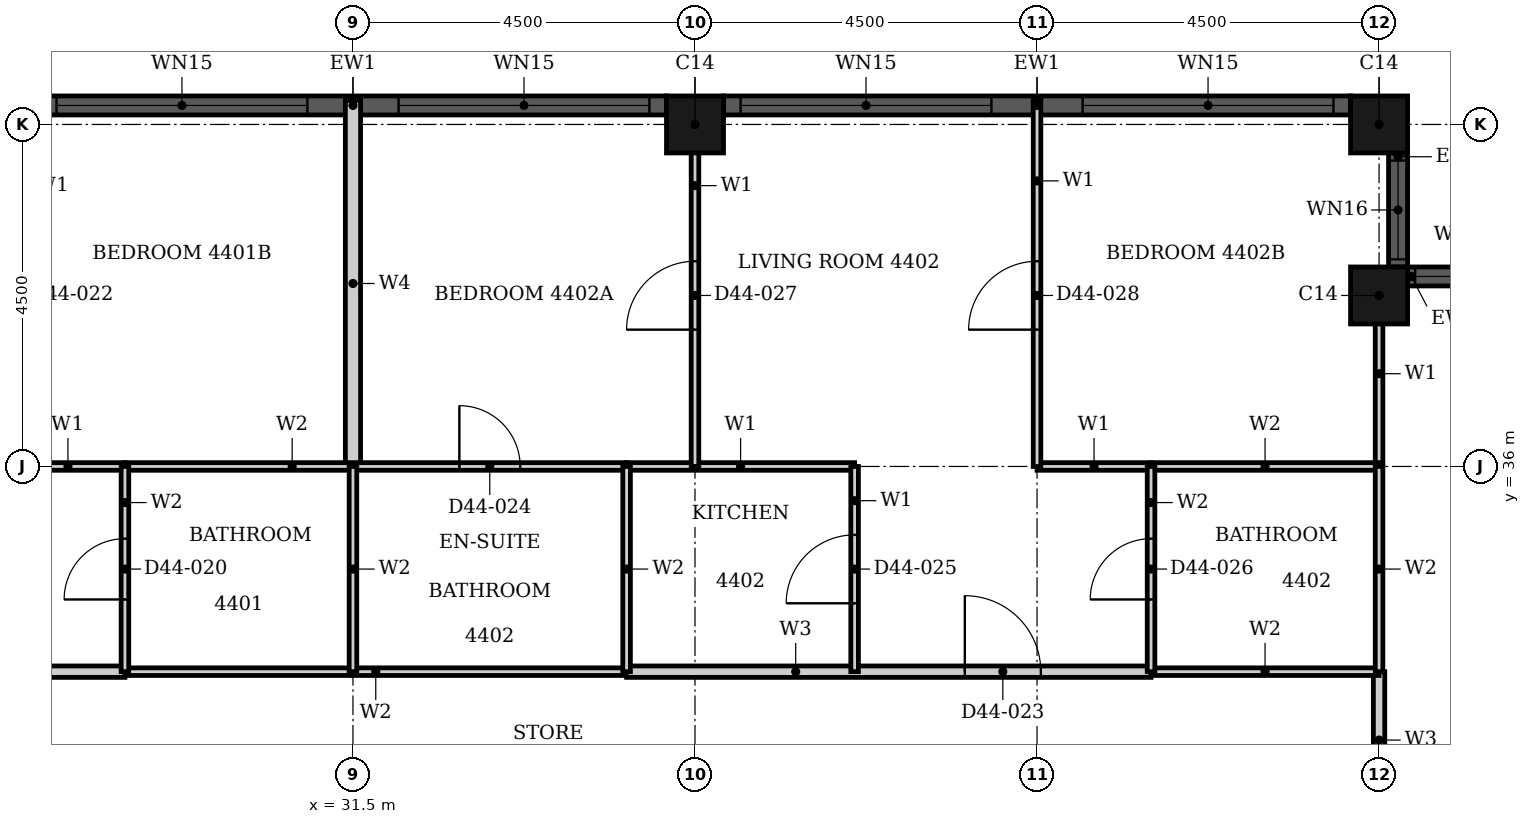
"""IFC4 building model, lengths in metres.
Left out: names, types, materials, properties, quantities, classifications, styles, units other than length and angle.
Written with IfcOpenShell. Run it as: python <this file> out.ifc"""

import sys

from ifc_helpers import new_model, si_unit, direction, frame, frame_2d, origin, origin_2d, place, context, subcontext, project, spatial, rectangle, hollow_rectangle, extrude, element, fill, save


model = new_model("IFC4")
c1 = context("Model", 3, precision=1e-05, world=origin(), true_north=direction((0.0, 1.0)))
c2 = subcontext(c1, "Body", "Model", "MODEL_VIEW")
j1 = project(units=[si_unit("LENGTHUNIT", "METRE"), si_unit("PLANEANGLEUNIT", "RADIAN")], contexts=[c1])
p1 = place(None, origin())
s1 = spatial("IfcSite", under=j1, at=p1, CompositionType="ELEMENT")
p2 = place(p1, origin())
s2 = spatial("IfcBuilding", under=s1, at=p2, CompositionType="ELEMENT")
p3 = place(p2, frame((0.0, 0.0, 176.5)))
s3 = spatial("IfcBuildingStorey", under=s2, at=p3, CompositionType="ELEMENT", Elevation=176.5)
for number, where, z_axis, x_axis in (
    (1, (45.0, 38.25, 0.0), (0.0, 0.0, 1.0), (1.0, 0.0, 0.0)),
    (2, (45.0, 40.5, 0.0), (0.0, 0.0, 1.0), (1.0, 0.0, 0.0)),
    (3, (36.0, 40.5, 0.0), (0.0, 0.0, 1.0), (1.0, 0.0, 0.0)),
):
    element("IfcColumn", number, at=place(p3, frame(where, z_axis=z_axis, x_axis=x_axis)), inside=s3, PredefinedType="COLUMN", context=c2, shape_type="SweptSolid", body=[
        extrude(hollow_rectangle(XDim=0.75, YDim=0.75, WallThickness=0.024, at=origin_2d()), origin(), (0.0, 0.0, 1.0), 3.7),
    ])
p4 = place(p3, frame((46.875, 38.5, 0.0), z_axis=(0.0, 0.0, 1.0), x_axis=(-1.0, 0.0, 0.0)))
e4 = element("IfcWall", 4, at=p4, inside=s3, PredefinedType="SOLIDWALL", context=c2, shape_type="SweptSolid", body=[
    extrude(rectangle(XDim=1.5, YDim=0.25, at=frame_2d((0.75, 0.0))), origin(), (0.0, 0.0, 1.0), 3.7),
])
p5 = place(p4, frame((0.1, 0.0, 0.9)))
e5 = element("IfcOpeningElement", 5, at=p5, cuts=e4, PredefinedType="OPENING", context=c2, shape_type="SweptSolid", body=[
    extrude(rectangle(XDim=1.3, YDim=1.85, at=frame_2d((0.65, 0.925))), frame((0.0, 0.135, 0.0), z_axis=(0.0, -1.0, 0.0), x_axis=(1.0, 0.0, 0.0)), (0.0, 0.0, 1.0), 0.27),
])
p6 = place(p3, frame((45.25, 38.625, 0.0), z_axis=(0.0, 0.0, 1.0), x_axis=(0.0, 1.0, 0.0)))
e6 = element("IfcWall", 6, at=p6, inside=s3, PredefinedType="SOLIDWALL", context=c2, shape_type="SweptSolid", body=[
    extrude(rectangle(XDim=1.5, YDim=0.25, at=frame_2d((0.75, 0.0))), origin(), (0.0, 0.0, 1.0), 3.7),
])
p7 = place(p6, frame((0.1, 0.0, 0.9)))
e7 = element("IfcOpeningElement", 7, at=p7, cuts=e6, PredefinedType="OPENING", context=c2, shape_type="SweptSolid", body=[
    extrude(rectangle(XDim=1.3, YDim=1.85, at=frame_2d((0.65, 0.925))), frame((0.0, 0.135, 0.0), z_axis=(0.0, -1.0, 0.0), x_axis=(1.0, 0.0, 0.0)), (0.0, 0.0, 1.0), 0.27),
])
p8 = place(p3, frame((44.625, 40.75, 0.0), z_axis=(0.0, 0.0, 1.0), x_axis=(-1.0, 0.0, 0.0)))
e8 = element("IfcWall", 8, at=p8, inside=s3, PredefinedType="SOLIDWALL", context=c2, shape_type="SweptSolid", body=[
    extrude(rectangle(XDim=8.25, YDim=0.25, at=frame_2d((4.125, 0.0))), origin(), (0.0, 0.0, 1.0), 3.7),
])
p9 = place(p8, frame((0.225, 0.0, 0.45)))
e9 = element("IfcOpeningElement", 9, at=p9, cuts=e8, PredefinedType="OPENING", context=c2, shape_type="SweptSolid", body=[
    extrude(rectangle(XDim=3.3, YDim=2.3, at=frame_2d((1.65, 1.15))), frame((0.0, 0.135, 0.0), z_axis=(0.0, -1.0, 0.0), x_axis=(1.0, 0.0, 0.0)), (0.0, 0.0, 1.0), 0.27),
])
p10 = place(p8, frame((4.725, 0.0, 0.45)))
e10 = element("IfcOpeningElement", 10, at=p10, cuts=e8, PredefinedType="OPENING", context=c2, shape_type="SweptSolid", body=[
    extrude(rectangle(XDim=3.3, YDim=2.3, at=frame_2d((1.65, 1.15))), frame((0.0, 0.135, 0.0), z_axis=(0.0, -1.0, 0.0), x_axis=(1.0, 0.0, 0.0)), (0.0, 0.0, 1.0), 0.27),
])
p11 = place(p3, frame((35.625, 40.75, 0.0), z_axis=(0.0, 0.0, 1.0), x_axis=(-1.0, 0.0, 0.0)))
e11 = element("IfcWall", 11, at=p11, inside=s3, PredefinedType="SOLIDWALL", context=c2, shape_type="SweptSolid", body=[
    extrude(rectangle(XDim=8.25, YDim=0.25, at=frame_2d((4.125, 0.0))), origin(), (0.0, 0.0, 1.0), 3.7),
])
p12 = place(p11, frame((0.225, 0.0, 0.45)))
e12 = element("IfcOpeningElement", 12, at=p12, cuts=e11, PredefinedType="OPENING", context=c2, shape_type="SweptSolid", body=[
    extrude(rectangle(XDim=3.3, YDim=2.3, at=frame_2d((1.65, 1.15))), frame((0.0, 0.135, 0.0), z_axis=(0.0, -1.0, 0.0), x_axis=(1.0, 0.0, 0.0)), (0.0, 0.0, 1.0), 0.27),
])
p13 = place(p11, frame((4.725, 0.0, 0.45)))
e13 = element("IfcOpeningElement", 13, at=p13, cuts=e11, PredefinedType="OPENING", context=c2, shape_type="SweptSolid", body=[
    extrude(rectangle(XDim=3.3, YDim=2.3, at=frame_2d((1.65, 1.15))), frame((0.0, 0.135, 0.0), z_axis=(0.0, -1.0, 0.0), x_axis=(1.0, 0.0, 0.0)), (0.0, 0.0, 1.0), 0.27),
])
p14 = place(p3, frame((21.6, 33.3, 0.0), z_axis=(0.0, 0.0, 1.0), x_axis=(1.0, 0.0, 0.0)))
e14 = element("IfcWall", 14, at=p14, inside=s3, PredefinedType="PARTITIONING", context=c2, shape_type="SweptSolid", body=[
    extrude(rectangle(XDim=6.9, YDim=0.15, at=frame_2d((3.45, 0.0))), origin(), (0.0, 0.0, 1.0), 3.4),
])
p15 = place(p14, frame((4.45, 0.0, 0.0)))
e15 = element("IfcOpeningElement", 15, at=p15, cuts=e14, PredefinedType="OPENING", context=c2, shape_type="SweptSolid", body=[
    extrude(rectangle(XDim=1.0, YDim=2.2, at=frame_2d((0.5, 1.1))), frame((0.0, 0.085, 0.0), z_axis=(0.0, -1.0, 0.0), x_axis=(1.0, 0.0, 0.0)), (0.0, 0.0, 1.0), 0.17),
])
p16 = place(p3, frame((35.1, 33.3, 0.0), z_axis=(0.0, 0.0, 1.0), x_axis=(1.0, 0.0, 0.0)))
e16 = element("IfcWall", 16, at=p16, inside=s3, PredefinedType="PARTITIONING", context=c2, shape_type="SweptSolid", body=[
    extrude(rectangle(XDim=6.9, YDim=0.15, at=frame_2d((3.45, 0.0))), origin(), (0.0, 0.0, 1.0), 3.4),
])
p17 = place(p16, frame((4.45, 0.0, 0.0)))
e17 = element("IfcOpeningElement", 17, at=p17, cuts=e16, PredefinedType="OPENING", context=c2, shape_type="SweptSolid", body=[
    extrude(rectangle(XDim=1.0, YDim=2.2, at=frame_2d((0.5, 1.1))), frame((0.0, 0.085, 0.0), z_axis=(0.0, -1.0, 0.0), x_axis=(1.0, 0.0, 0.0)), (0.0, 0.0, 1.0), 0.17),
])
p18 = place(p3, frame((45.0, 31.5, 0.0), z_axis=(0.0, 0.0, 1.0), x_axis=(0.0, 1.0, 0.0)))
e18 = element("IfcWall", 18, at=p18, inside=s3, PredefinedType="PARTITIONING", context=c2, shape_type="SweptSolid", body=[
    extrude(rectangle(XDim=1.8, YDim=0.15, at=frame_2d((0.9, 0.0))), origin(), (0.0, 0.0, 1.0), 3.4),
])
for number, where, z_axis, x_axis in (
    (19, (27.0, 36.0, 0.0), (0.0, 0.0, 1.0), (1.0, 0.0, 0.0)),
    (20, (40.5, 36.0, 0.0), (0.0, 0.0, 1.0), (1.0, 0.0, 0.0)),
):
    element("IfcWall", number, at=place(p3, frame(where, z_axis=z_axis, x_axis=x_axis)), inside=s3, PredefinedType="PARTITIONING", context=c2, shape_type="SweptSolid", body=[
        extrude(rectangle(XDim=1.5, YDim=0.1, at=frame_2d((0.75, 0.0))), origin(), (0.0, 0.0, 1.0), 3.4),
    ])
p19 = place(p3, frame((35.1, 36.0, 0.0), z_axis=(0.0, 0.0, 1.0), x_axis=(1.0, 0.0, 0.0)))
e21 = element("IfcWall", 21, at=p19, inside=s3, PredefinedType="PARTITIONING", context=c2, shape_type="SweptSolid", body=[
    extrude(rectangle(XDim=3.0, YDim=0.1, at=frame_2d((1.5, 0.0))), origin(), (0.0, 0.0, 1.0), 3.4),
])
p20 = place(p3, frame((36.0, 36.0, 0.0), z_axis=(0.0, 0.0, 1.0), x_axis=(0.0, 1.0, 0.0)))
e22 = element("IfcWall", 22, at=p20, inside=s3, PredefinedType="PARTITIONING", context=c2, shape_type="SweptSolid", body=[
    extrude(rectangle(XDim=4.69, YDim=0.1, at=frame_2d((2.345, 0.0))), origin(), (0.0, 0.0, 1.0), 3.4),
])
p21 = place(p20, frame((1.8, 0.0, 0.0)))
e23 = element("IfcOpeningElement", 23, at=p21, cuts=e22, PredefinedType="OPENING", context=c2, shape_type="SweptSolid", body=[
    extrude(rectangle(XDim=0.9, YDim=2.1, at=frame_2d((0.45, 1.05))), frame((0.0, 0.06, 0.0), z_axis=(0.0, -1.0, 0.0), x_axis=(1.0, 0.0, 0.0)), (0.0, 0.0, 1.0), 0.12),
])
p22 = place(p3, frame((38.1, 33.3, 0.0), z_axis=(0.0, 0.0, 1.0), x_axis=(0.0, 1.0, 0.0)))
e24 = element("IfcWall", 24, at=p22, inside=s3, PredefinedType="PARTITIONING", context=c2, shape_type="SweptSolid", body=[
    extrude(rectangle(XDim=2.7, YDim=0.1, at=frame_2d((1.35, 0.0))), origin(), (0.0, 0.0, 1.0), 3.4),
])
p23 = place(p22, frame((0.9, 0.0, 0.0)))
e25 = element("IfcOpeningElement", 25, at=p23, cuts=e24, PredefinedType="OPENING", context=c2, shape_type="SweptSolid", body=[
    extrude(rectangle(XDim=0.9, YDim=2.1, at=frame_2d((0.45, 1.05))), frame((0.0, 0.06, 0.0), z_axis=(0.0, -1.0, 0.0), x_axis=(1.0, 0.0, 0.0)), (0.0, 0.0, 1.0), 0.12),
])
p24 = place(p3, frame((40.5, 36.0, 0.0), z_axis=(0.0, 0.0, 1.0), x_axis=(0.0, 1.0, 0.0)))
e26 = element("IfcWall", 26, at=p24, inside=s3, PredefinedType="PARTITIONING", context=c2, shape_type="SweptSolid", body=[
    extrude(rectangle(XDim=4.815, YDim=0.1, at=frame_2d((2.407, 0.0))), origin(), (0.0, 0.0, 1.0), 3.4),
])
p25 = place(p24, frame((1.8, 0.0, 0.0)))
e27 = element("IfcOpeningElement", 27, at=p25, cuts=e26, PredefinedType="OPENING", context=c2, shape_type="SweptSolid", body=[
    extrude(rectangle(XDim=0.9, YDim=2.1, at=frame_2d((0.45, 1.05))), frame((0.0, 0.06, 0.0), z_axis=(0.0, -1.0, 0.0), x_axis=(1.0, 0.0, 0.0)), (0.0, 0.0, 1.0), 0.12),
])
p26 = place(p3, frame((45.0, 36.001, 0.0), z_axis=(0.0, 0.0, 1.0), x_axis=(0.0, 1.0, 0.0)))
e28 = element("IfcWall", 28, at=p26, inside=s3, PredefinedType="PARTITIONING", context=c2, shape_type="SweptSolid", body=[
    extrude(rectangle(XDim=2.439, YDim=0.1, at=frame_2d((1.219, 0.0))), origin(), (0.0, 0.0, 1.0), 3.4),
])
p27 = place(p3, frame((31.5, 36.0, 0.0), z_axis=(0.0, 0.0, 1.0), x_axis=(0.0, 1.0, 0.0)))
e29 = element("IfcWall", 29, at=p27, inside=s3, PredefinedType="PARTITIONING", context=c2, shape_type="SweptSolid", body=[
    extrude(rectangle(XDim=4.815, YDim=0.2, at=frame_2d((2.407, 0.0))), origin(), (0.0, 0.0, 1.0), 3.4),
])
p28 = place(p3, frame((28.5, 33.3, 0.0), z_axis=(0.0, 0.0, 1.0), x_axis=(1.0, 0.0, 0.0)))
e30 = element("IfcWall", 30, at=p28, inside=s3, PredefinedType="PARTITIONING", context=c2, shape_type="SweptSolid", body=[
    extrude(rectangle(XDim=6.6, YDim=0.1, at=frame_2d((3.3, 0.0))), origin(), (0.0, 0.0, 1.0), 3.4),
])
p29 = place(p3, frame((42.0, 33.3, 0.0), z_axis=(0.0, 0.0, 1.0), x_axis=(1.0, 0.0, 0.0)))
e31 = element("IfcWall", 31, at=p29, inside=s3, PredefinedType="PARTITIONING", context=c2, shape_type="SweptSolid", body=[
    extrude(rectangle(XDim=3.0, YDim=0.1, at=frame_2d((1.5, 0.0))), origin(), (0.0, 0.0, 1.0), 3.4),
])
p30 = place(p3, frame((28.5, 36.0, 0.0), z_axis=(0.0, 0.0, 1.0), x_axis=(1.0, 0.0, 0.0)))
e32 = element("IfcWall", 32, at=p30, inside=s3, PredefinedType="PARTITIONING", context=c2, shape_type="SweptSolid", body=[
    extrude(rectangle(XDim=6.6, YDim=0.1, at=frame_2d((3.3, 0.0))), origin(), (0.0, 0.0, 1.0), 3.4),
])
p31 = place(p30, frame((4.4, 0.0, 0.0)))
e33 = element("IfcOpeningElement", 33, at=p31, cuts=e32, PredefinedType="OPENING", context=c2, shape_type="SweptSolid", body=[
    extrude(rectangle(XDim=0.8, YDim=2.1, at=frame_2d((0.4, 1.05))), frame((0.0, 0.06, 0.0), z_axis=(0.0, -1.0, 0.0), x_axis=(1.0, 0.0, 0.0)), (0.0, 0.0, 1.0), 0.12),
])
p32 = place(p3, frame((42.0, 36.0, 0.0), z_axis=(0.0, 0.0, 1.0), x_axis=(1.0, 0.0, 0.0)))
e34 = element("IfcWall", 34, at=p32, inside=s3, PredefinedType="PARTITIONING", context=c2, shape_type="SweptSolid", body=[
    extrude(rectangle(XDim=3.0, YDim=0.1, at=frame_2d((1.5, 0.0))), origin(), (0.0, 0.0, 1.0), 3.4),
])
p33 = place(p3, frame((28.5, 33.3, 0.0), z_axis=(0.0, 0.0, 1.0), x_axis=(0.0, 1.0, 0.0)))
e35 = element("IfcWall", 35, at=p33, inside=s3, PredefinedType="PARTITIONING", context=c2, shape_type="SweptSolid", body=[
    extrude(rectangle(XDim=2.7, YDim=0.1, at=frame_2d((1.35, 0.0))), origin(), (0.0, 0.0, 1.0), 3.4),
])
p34 = place(p33, frame((0.95, 0.0, 0.0)))
e36 = element("IfcOpeningElement", 36, at=p34, cuts=e35, PredefinedType="OPENING", context=c2, shape_type="SweptSolid", body=[
    extrude(rectangle(XDim=0.8, YDim=2.1, at=frame_2d((0.4, 1.05))), frame((0.0, 0.06, 0.0), z_axis=(0.0, -1.0, 0.0), x_axis=(1.0, 0.0, 0.0)), (0.0, 0.0, 1.0), 0.12),
])
for number, where, z_axis, x_axis in (
    (37, (31.5, 33.3, 0.0), (0.0, 0.0, 1.0), (0.0, 1.0, 0.0)),
    (38, (35.1, 33.3, 0.0), (0.0, 0.0, 1.0), (0.0, 1.0, 0.0)),
):
    element("IfcWall", number, at=place(p3, frame(where, z_axis=z_axis, x_axis=x_axis)), inside=s3, PredefinedType="PARTITIONING", context=c2, shape_type="SweptSolid", body=[
        extrude(rectangle(XDim=2.7, YDim=0.1, at=frame_2d((1.35, 0.0))), origin(), (0.0, 0.0, 1.0), 3.4),
    ])
p35 = place(p3, frame((42.0, 33.3, 0.0), z_axis=(0.0, 0.0, 1.0), x_axis=(0.0, 1.0, 0.0)))
e39 = element("IfcWall", 39, at=p35, inside=s3, PredefinedType="PARTITIONING", context=c2, shape_type="SweptSolid", body=[
    extrude(rectangle(XDim=2.7, YDim=0.1, at=frame_2d((1.35, 0.0))), origin(), (0.0, 0.0, 1.0), 3.4),
])
p36 = place(p35, frame((0.95, 0.0, 0.0)))
e40 = element("IfcOpeningElement", 40, at=p36, cuts=e39, PredefinedType="OPENING", context=c2, shape_type="SweptSolid", body=[
    extrude(rectangle(XDim=0.8, YDim=2.1, at=frame_2d((0.4, 1.05))), frame((0.0, 0.06, 0.0), z_axis=(0.0, -1.0, 0.0), x_axis=(1.0, 0.0, 0.0)), (0.0, 0.0, 1.0), 0.12),
])
p37 = place(p3, frame((45.0, 33.3, 0.0), z_axis=(0.0, 0.0, 1.0), x_axis=(0.0, 1.0, 0.0)))
e41 = element("IfcWall", 41, at=p37, inside=s3, PredefinedType="PARTITIONING", context=c2, shape_type="SweptSolid", body=[
    extrude(rectangle(XDim=2.7, YDim=0.1, at=frame_2d((1.35, 0.0))), origin(), (0.0, 0.0, 1.0), 3.4),
])
p38 = place(p5, origin())
e42 = element("IfcWindow", 42, at=p38, inside=s3, PartitioningType="SINGLE_PANEL", PredefinedType="WINDOW", context=c2, shape_type="SweptSolid", body=[
    extrude(rectangle(XDim=1.3, YDim=1.85, at=frame_2d((0.65, 0.925))), frame((0.0, 0.03, 0.0), z_axis=(0.0, -1.0, 0.0), x_axis=(1.0, 0.0, 0.0)), (0.0, 0.0, 1.0), 0.06),
])
fill(e5, e42)
p39 = place(p7, origin())
e43 = element("IfcWindow", 43, at=p39, inside=s3, PartitioningType="SINGLE_PANEL", PredefinedType="WINDOW", context=c2, shape_type="SweptSolid", body=[
    extrude(rectangle(XDim=1.3, YDim=1.85, at=frame_2d((0.65, 0.925))), frame((0.0, 0.03, 0.0), z_axis=(0.0, -1.0, 0.0), x_axis=(1.0, 0.0, 0.0)), (0.0, 0.0, 1.0), 0.06),
])
fill(e7, e43)
p40 = place(p9, origin())
e44 = element("IfcWindow", 44, at=p40, inside=s3, PartitioningType="SINGLE_PANEL", PredefinedType="WINDOW", context=c2, shape_type="SweptSolid", body=[
    extrude(rectangle(XDim=3.3, YDim=2.3, at=frame_2d((1.65, 1.15))), frame((0.0, 0.03, 0.0), z_axis=(0.0, -1.0, 0.0), x_axis=(1.0, 0.0, 0.0)), (0.0, 0.0, 1.0), 0.06),
])
fill(e9, e44)
p41 = place(p10, origin())
e45 = element("IfcWindow", 45, at=p41, inside=s3, PartitioningType="SINGLE_PANEL", PredefinedType="WINDOW", context=c2, shape_type="SweptSolid", body=[
    extrude(rectangle(XDim=3.3, YDim=2.3, at=frame_2d((1.65, 1.15))), frame((0.0, 0.03, 0.0), z_axis=(0.0, -1.0, 0.0), x_axis=(1.0, 0.0, 0.0)), (0.0, 0.0, 1.0), 0.06),
])
fill(e10, e45)
p42 = place(p12, origin())
e46 = element("IfcWindow", 46, at=p42, inside=s3, PartitioningType="SINGLE_PANEL", PredefinedType="WINDOW", context=c2, shape_type="SweptSolid", body=[
    extrude(rectangle(XDim=3.3, YDim=2.3, at=frame_2d((1.65, 1.15))), frame((0.0, 0.03, 0.0), z_axis=(0.0, -1.0, 0.0), x_axis=(1.0, 0.0, 0.0)), (0.0, 0.0, 1.0), 0.06),
])
fill(e12, e46)
p43 = place(p13, origin())
e47 = element("IfcWindow", 47, at=p43, inside=s3, PartitioningType="SINGLE_PANEL", PredefinedType="WINDOW", context=c2, shape_type="SweptSolid", body=[
    extrude(rectangle(XDim=3.3, YDim=2.3, at=frame_2d((1.65, 1.15))), frame((0.0, 0.03, 0.0), z_axis=(0.0, -1.0, 0.0), x_axis=(1.0, 0.0, 0.0)), (0.0, 0.0, 1.0), 0.06),
])
fill(e13, e47)
p44 = place(p34, origin())
e48 = element("IfcDoor", 48, at=p44, inside=s3, OperationType="SINGLE_SWING_LEFT", PredefinedType="DOOR", context=c2, shape_type="SweptSolid", body=[
    extrude(rectangle(XDim=0.8, YDim=2.1, at=frame_2d((0.4, 1.05))), frame((0.0, 0.025, 0.0), z_axis=(0.0, -1.0, 0.0), x_axis=(1.0, 0.0, 0.0)), (0.0, 0.0, 1.0), 0.05),
])
fill(e36, e48)
p45 = place(p17, origin())
e49 = element("IfcDoor", 49, at=p45, inside=s3, OperationType="SINGLE_SWING_RIGHT", PredefinedType="DOOR", context=c2, shape_type="SweptSolid", body=[
    extrude(rectangle(XDim=1.0, YDim=2.2, at=frame_2d((0.5, 1.1))), frame((0.0, 0.025, 0.0), z_axis=(0.0, -1.0, 0.0), x_axis=(1.0, 0.0, 0.0)), (0.0, 0.0, 1.0), 0.05),
])
fill(e17, e49)
p46 = place(p31, origin())
e50 = element("IfcDoor", 50, at=p46, inside=s3, OperationType="SINGLE_SWING_LEFT", PredefinedType="DOOR", context=c2, shape_type="SweptSolid", body=[
    extrude(rectangle(XDim=0.8, YDim=2.1, at=frame_2d((0.4, 1.05))), frame((0.0, 0.025, 0.0), z_axis=(0.0, -1.0, 0.0), x_axis=(1.0, 0.0, 0.0)), (0.0, 0.0, 1.0), 0.05),
])
fill(e33, e50)
p47 = place(p23, origin())
e51 = element("IfcDoor", 51, at=p47, inside=s3, OperationType="SINGLE_SWING_LEFT", PredefinedType="DOOR", context=c2, shape_type="SweptSolid", body=[
    extrude(rectangle(XDim=0.9, YDim=2.1, at=frame_2d((0.45, 1.05))), frame((0.0, 0.025, 0.0), z_axis=(0.0, -1.0, 0.0), x_axis=(1.0, 0.0, 0.0)), (0.0, 0.0, 1.0), 0.05),
])
fill(e25, e51)
p48 = place(p36, origin())
e52 = element("IfcDoor", 52, at=p48, inside=s3, OperationType="SINGLE_SWING_RIGHT", PredefinedType="DOOR", context=c2, shape_type="SweptSolid", body=[
    extrude(rectangle(XDim=0.8, YDim=2.1, at=frame_2d((0.4, 1.05))), frame((0.0, 0.025, 0.0), z_axis=(0.0, -1.0, 0.0), x_axis=(1.0, 0.0, 0.0)), (0.0, 0.0, 1.0), 0.05),
])
fill(e40, e52)
p49 = place(p21, origin())
e53 = element("IfcDoor", 53, at=p49, inside=s3, OperationType="SINGLE_SWING_RIGHT", PredefinedType="DOOR", context=c2, shape_type="SweptSolid", body=[
    extrude(rectangle(XDim=0.9, YDim=2.1, at=frame_2d((0.45, 1.05))), frame((0.0, 0.025, 0.0), z_axis=(0.0, -1.0, 0.0), x_axis=(1.0, 0.0, 0.0)), (0.0, 0.0, 1.0), 0.05),
])
fill(e23, e53)
p50 = place(p25, origin())
e54 = element("IfcDoor", 54, at=p50, inside=s3, OperationType="SINGLE_SWING_RIGHT", PredefinedType="DOOR", context=c2, shape_type="SweptSolid", body=[
    extrude(rectangle(XDim=0.9, YDim=2.1, at=frame_2d((0.45, 1.05))), frame((0.0, 0.025, 0.0), z_axis=(0.0, -1.0, 0.0), x_axis=(1.0, 0.0, 0.0)), (0.0, 0.0, 1.0), 0.05),
])
fill(e27, e54)
save(model, sys.argv[1])
